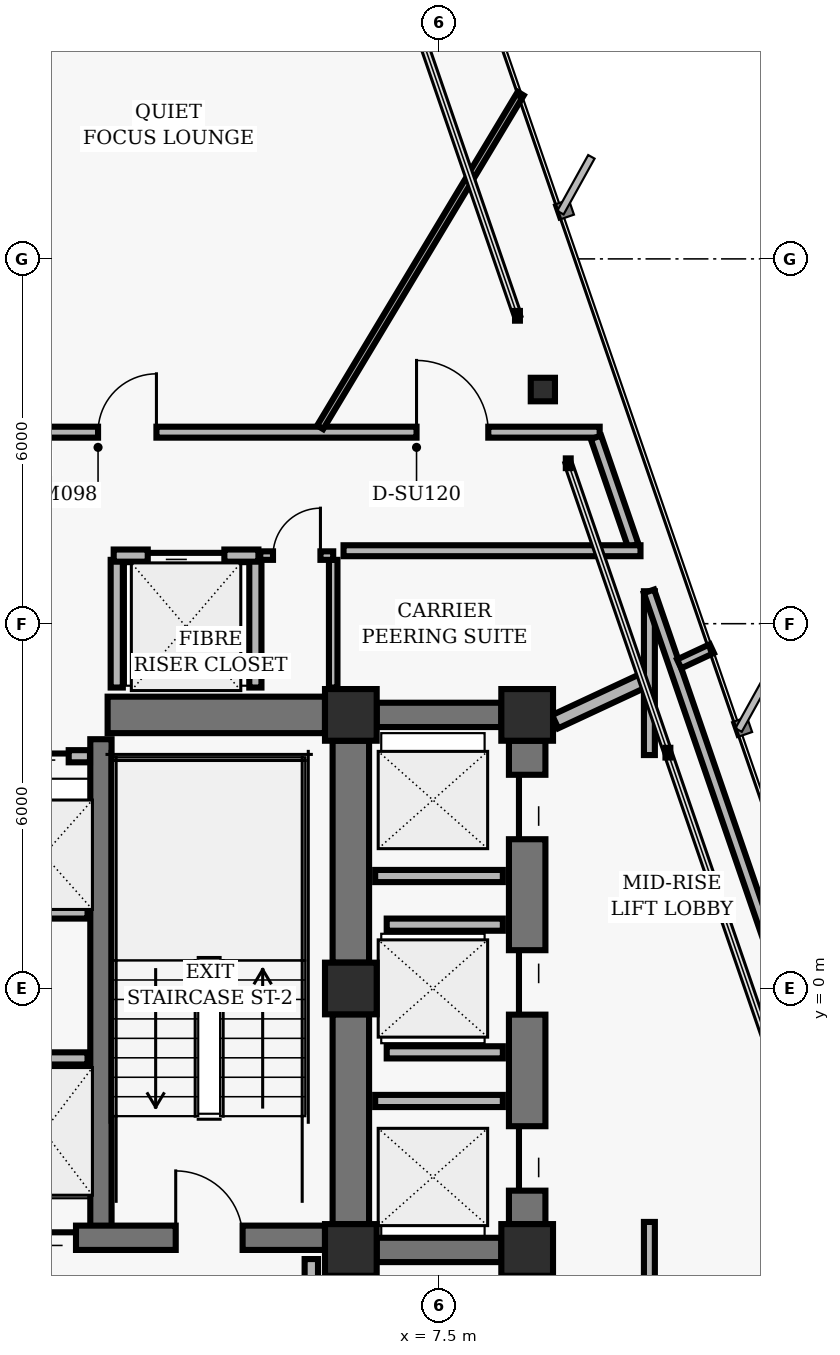
"""IFC4 building model, lengths in metres.
Left out: names, types, materials, properties, quantities, classifications, styles, units other than length and angle.
Written with IfcOpenShell. Run it as: python <this file> out.ifc"""

import sys

from ifc_helpers import new_model, si_unit, direction, frame, frame_2d, origin, origin_2d, place, context, subcontext, project, spatial, rectangle, hollow_rectangle, i_section, extrude, element, fill, save


model = new_model("IFC4")
c1 = context("Model", 3, precision=1e-05, world=origin(), true_north=direction((0.0, 1.0)))
c2 = subcontext(c1, "Body", "Model", "MODEL_VIEW")
j1 = project(units=[si_unit("LENGTHUNIT", "METRE"), si_unit("PLANEANGLEUNIT", "RADIAN")], contexts=[c1])
p1 = place(None, origin())
s1 = spatial("IfcSite", under=j1, at=p1, CompositionType="ELEMENT")
p2 = place(p1, origin())
s2 = spatial("IfcBuilding", under=s1, at=p2, CompositionType="ELEMENT")
p3 = place(p2, frame((0.0, 0.0, 168.48)))
s3 = spatial("IfcBuildingStorey", under=s2, at=p3, CompositionType="ELEMENT", Elevation=168.48)
for number, where, z_axis, x_axis in (
    (1, (6.05, 4.5, 0.0), (0.0, 0.0, 1.0), (1.0, 0.0, 0.0)),
    (2, (6.05, 0.0, 0.0), (0.0, 0.0, 1.0), (1.0, 0.0, 0.0)),
    (3, (6.05, -4.3, 0.0), (0.0, 0.0, 1.0), (1.0, 0.0, 0.0)),
    (4, (8.95, 4.5, 0.0), (0.0, 0.0, 1.0), (1.0, 0.0, 0.0)),
    (5, (8.95, -4.3, 0.0), (0.0, 0.0, 1.0), (1.0, 0.0, 0.0)),
):
    element("IfcColumn", number, at=place(p3, frame(where, z_axis=z_axis, x_axis=x_axis)), inside=s3, PredefinedType="COLUMN", context=c2, shape_type="SweptSolid", body=[
        extrude(hollow_rectangle(XDim=0.85, YDim=0.85, WallThickness=0.055, InnerFilletRadius=0.02, OuterFilletRadius=0.04, at=origin_2d()), origin(), (0.0, 0.0, 1.0), 3.04),
    ])
p4 = place(p3, frame((6.05, 0.425, 0.0), z_axis=(0.0, 0.0, 1.0), x_axis=(0.0, 1.0, 0.0)))
e6 = element("IfcWall", 6, at=p4, inside=s3, PredefinedType="SHEAR", context=c2, shape_type="SweptSolid", body=[
    extrude(rectangle(XDim=3.65, YDim=0.6, at=frame_2d((1.825, 0.0))), origin(), (0.0, 0.0, 1.0), 2.718),
])
p5 = place(p3, frame((6.05, -3.875, 0.0), z_axis=(0.0, 0.0, 1.0), x_axis=(0.0, 1.0, 0.0)))
e7 = element("IfcWall", 7, at=p5, inside=s3, PredefinedType="SHEAR", context=c2, shape_type="SweptSolid", body=[
    extrude(rectangle(XDim=3.45, YDim=0.6, at=frame_2d((1.725, 0.0))), origin(), (0.0, 0.0, 1.0), 2.718),
])
p6 = place(p3, frame((1.94, -4.1, 0.0), z_axis=(0.0, 0.0, 1.0), x_axis=(0.0, 1.0, 0.0)))
e8 = element("IfcWall", 8, at=p6, inside=s3, PredefinedType="SHEAR", context=c2, shape_type="SweptSolid", body=[
    extrude(rectangle(XDim=8.2, YDim=0.35, at=frame_2d((4.1, 0.0))), origin(), (0.0, 0.0, 1.0), 2.718),
])
p7 = place(p3, frame((-5.625, -4.1, 0.0), z_axis=(0.0, 0.0, 1.0), x_axis=(1.0, 0.0, 0.0)))
e9 = element("IfcWall", 9, at=p7, inside=s3, PredefinedType="SHEAR", context=c2, shape_type="SweptSolid", body=[
    extrude(rectangle(XDim=11.25, YDim=0.4, at=frame_2d((5.625, 0.0))), origin(), (0.0, 0.0, 1.0), 2.718),
])
p8 = place(p7, frame((1.355, 0.0, 0.0)))
e10 = element("IfcOpeningElement", 10, at=p8, cuts=e9, PredefinedType="OPENING", context=c2, shape_type="SweptSolid", body=[
    extrude(rectangle(XDim=1.1, YDim=2.04, at=frame_2d((0.55, 1.02))), frame((0.0, 0.21, 0.0), z_axis=(0.0, -1.0, 0.0), x_axis=(1.0, 0.0, 0.0)), (0.0, 0.0, 1.0), 0.42),
])
p9 = place(p7, frame((8.795, 0.0, 0.0)))
e11 = element("IfcOpeningElement", 11, at=p9, cuts=e9, PredefinedType="OPENING", context=c2, shape_type="SweptSolid", body=[
    extrude(rectangle(XDim=1.1, YDim=2.04, at=frame_2d((0.55, 1.02))), frame((0.0, 0.21, 0.0), z_axis=(0.0, -1.0, 0.0), x_axis=(1.0, 0.0, 0.0)), (0.0, 0.0, 1.0), 0.42),
])
p10 = place(p7, frame((4.095, 0.0, 0.0)))
e12 = element("IfcOpeningElement", 12, at=p10, cuts=e9, PredefinedType="OPENING", context=c2, shape_type="SweptSolid", body=[
    extrude(rectangle(XDim=1.06, YDim=2.04, at=frame_2d((0.53, 1.02))), frame((0.0, 0.21, 0.0), z_axis=(0.0, -1.0, 0.0), x_axis=(1.0, 0.0, 0.0)), (0.0, 0.0, 1.0), 0.42),
])
p11 = place(p7, frame((6.095, 0.0, 0.0)))
e13 = element("IfcOpeningElement", 13, at=p11, cuts=e9, PredefinedType="OPENING", context=c2, shape_type="SweptSolid", body=[
    extrude(rectangle(XDim=1.06, YDim=2.04, at=frame_2d((0.53, 1.02))), frame((0.0, 0.21, 0.0), z_axis=(0.0, -1.0, 0.0), x_axis=(1.0, 0.0, 0.0)), (0.0, 0.0, 1.0), 0.42),
])
p12 = place(p3, frame((2.05, 4.5, 0.0), z_axis=(0.0, 0.0, 1.0), x_axis=(1.0, 0.0, 0.0)))
e14 = element("IfcWall", 14, at=p12, inside=s3, PredefinedType="SHEAR", context=c2, shape_type="SweptSolid", body=[
    extrude(rectangle(XDim=3.575, YDim=0.6, at=frame_2d((1.788, 0.0))), origin(), (0.0, 0.0, 1.0), 2.718),
])
p13 = place(p3, frame((8.95, -3.875, 0.0), z_axis=(0.0, 0.0, 1.0), x_axis=(0.0, 1.0, 0.0)))
e15 = element("IfcWall", 15, at=p13, inside=s3, PredefinedType="SHEAR", context=c2, shape_type="SweptSolid", body=[
    extrude(rectangle(XDim=7.95, YDim=0.6, at=frame_2d((3.975, 0.0))), origin(), (0.0, 0.0, 1.0), 2.718),
])
p14 = place(p13, frame((0.55, 0.0, 0.0)))
e16 = element("IfcOpeningElement", 16, at=p14, cuts=e15, PredefinedType="OPENING", context=c2, shape_type="SweptSolid", body=[
    extrude(rectangle(XDim=1.06, YDim=2.04, at=frame_2d((0.53, 1.02))), frame((0.0, 0.31, 0.0), z_axis=(0.0, -1.0, 0.0), x_axis=(1.0, 0.0, 0.0)), (0.0, 0.0, 1.0), 0.62),
])
p15 = place(p13, frame((3.445, 0.0, 0.0)))
e17 = element("IfcOpeningElement", 17, at=p15, cuts=e15, PredefinedType="OPENING", context=c2, shape_type="SweptSolid", body=[
    extrude(rectangle(XDim=1.06, YDim=2.04, at=frame_2d((0.53, 1.02))), frame((0.0, 0.31, 0.0), z_axis=(0.0, -1.0, 0.0), x_axis=(1.0, 0.0, 0.0)), (0.0, 0.0, 1.0), 0.62),
])
p16 = place(p13, frame((6.33, 0.0, 0.0)))
e18 = element("IfcOpeningElement", 18, at=p16, cuts=e15, PredefinedType="OPENING", context=c2, shape_type="SweptSolid", body=[
    extrude(rectangle(XDim=1.06, YDim=2.04, at=frame_2d((0.53, 1.02))), frame((0.0, 0.31, 0.0), z_axis=(0.0, -1.0, 0.0), x_axis=(1.0, 0.0, 0.0)), (0.0, 0.0, 1.0), 0.62),
])
for number, where, z_axis, x_axis in (
    (19, (6.475, 4.5, 0.0), (0.0, 0.0, 1.0), (1.0, 0.0, 0.0)),
    (20, (6.475, -4.3, 0.0), (0.0, 0.0, 1.0), (1.0, 0.0, 0.0)),
):
    element("IfcWall", number, at=place(p3, frame(where, z_axis=z_axis, x_axis=x_axis)), inside=s3, PredefinedType="SHEAR", context=c2, shape_type="SweptSolid", body=[
        extrude(rectangle(XDim=2.05, YDim=0.4, at=frame_2d((1.025, 0.0))), origin(), (0.0, 0.0, 1.0), 2.718),
    ])
p17 = place(p3, frame((9.208, 9.851, 0.0), z_axis=(0.0, 0.0, 1.0), x_axis=(1.0, 0.0, 0.0)))
e21 = element("IfcColumn", 21, at=p17, inside=s3, PredefinedType="COLUMN", context=c2, shape_type="SweptSolid", body=[
    extrude(i_section(OverallWidth=0.398, OverallDepth=0.387, WebThickness=0.021, FlangeThickness=0.033, FilletRadius=0.018, at=origin_2d()), origin(), (0.0, 0.0, 1.0), 3.04),
])
p18 = place(p3, frame((-1.72, -1.15, 0.0), z_axis=(0.0, 0.0, 1.0), x_axis=(1.0, 0.0, 0.0)))
e22 = element("IfcWall", 22, at=p18, inside=s3, PredefinedType="PARTITIONING", context=c2, shape_type="SweptSolid", body=[
    extrude(rectangle(XDim=3.44, YDim=0.2, at=frame_2d((1.72, 0.0))), origin(), (0.0, 0.0, 1.0), 2.693),
])
p19 = place(p3, frame((5.4, -7.16, 0.0), z_axis=(0.0, 0.0, 1.0), x_axis=(0.0, 1.0, 0.0)))
e23 = element("IfcWall", 23, at=p19, inside=s3, PredefinedType="PARTITIONING", context=c2, shape_type="SweptSolid", body=[
    extrude(rectangle(XDim=2.71, YDim=0.22, at=frame_2d((1.355, 0.0))), origin(), (0.0, 0.0, 1.0), 2.693),
])
p20 = place(p3, frame((-1.72, 1.25, 0.0), z_axis=(0.0, 0.0, 1.0), x_axis=(1.0, 0.0, 0.0)))
e24 = element("IfcWall", 24, at=p20, inside=s3, PredefinedType="PARTITIONING", context=c2, shape_type="SweptSolid", body=[
    extrude(rectangle(XDim=3.44, YDim=0.2, at=frame_2d((1.72, 0.0))), origin(), (0.0, 0.0, 1.0), 2.693),
])
p21 = place(p3, frame((-1.76, 3.82, 0.0), z_axis=(0.0, 0.0, 1.0), x_axis=(1.0, 0.0, 0.0)))
e25 = element("IfcWall", 25, at=p21, inside=s3, PredefinedType="PARTITIONING", context=c2, shape_type="SweptSolid", body=[
    extrude(rectangle(XDim=3.52, YDim=0.2, at=frame_2d((1.76, 0.0))), origin(), (0.0, 0.0, 1.0), 2.693),
])
p22 = place(p21, frame((0.35, 0.0, 0.0)))
e26 = element("IfcOpeningElement", 26, at=p22, cuts=e25, PredefinedType="OPENING", context=c2, shape_type="SweptSolid", body=[
    extrude(rectangle(XDim=1.06, YDim=2.04, at=frame_2d((0.53, 1.02))), frame((0.0, 0.11, 0.0), z_axis=(0.0, -1.0, 0.0), x_axis=(1.0, 0.0, 0.0)), (0.0, 0.0, 1.0), 0.22),
])
p23 = place(p21, frame((2.11, 0.0, 0.0)))
e27 = element("IfcOpeningElement", 27, at=p23, cuts=e25, PredefinedType="OPENING", context=c2, shape_type="SweptSolid", body=[
    extrude(rectangle(XDim=1.06, YDim=2.04, at=frame_2d((0.53, 1.02))), frame((0.0, 0.11, 0.0), z_axis=(0.0, -1.0, 0.0), x_axis=(1.0, 0.0, 0.0)), (0.0, 0.0, 1.0), 0.22),
])
for number, where, z_axis, x_axis in (
    (28, (2.2, 4.95, 0.0), (0.0, 0.0, 1.0), (0.0, 1.0, 0.0)),
    (29, (4.48, 4.95, 0.0), (0.0, 0.0, 1.0), (0.0, 1.0, 0.0)),
):
    element("IfcWall", number, at=place(p3, frame(where, z_axis=z_axis, x_axis=x_axis)), inside=s3, PredefinedType="PARTITIONING", context=c2, shape_type="SweptSolid", body=[
        extrude(rectangle(XDim=2.1, YDim=0.2, at=frame_2d((1.05, 0.0))), origin(), (0.0, 0.0, 1.0), 2.693),
    ])
p24 = place(p3, frame((2.15, 7.12, 0.0), z_axis=(0.0, 0.0, 1.0), x_axis=(1.0, 0.0, 0.0)))
e30 = element("IfcWall", 30, at=p24, inside=s3, PredefinedType="PARTITIONING", context=c2, shape_type="SweptSolid", body=[
    extrude(rectangle(XDim=2.38, YDim=0.2, at=frame_2d((1.19, 0.0))), origin(), (0.0, 0.0, 1.0), 2.693),
])
p25 = place(p24, frame((0.56, 0.0, 0.0)))
e31 = element("IfcOpeningElement", 31, at=p25, cuts=e30, PredefinedType="OPENING", context=c2, shape_type="SweptSolid", body=[
    extrude(rectangle(XDim=1.26, YDim=2.06, at=frame_2d((0.63, 1.03))), frame((0.0, 0.11, 0.0), z_axis=(0.0, -1.0, 0.0), x_axis=(1.0, 0.0, 0.0)), (0.0, 0.0, 1.0), 0.22),
])
p26 = place(p3, frame((5.76, 4.95, 0.0), z_axis=(0.0, 0.0, 1.0), x_axis=(0.0, 1.0, 0.0)))
e32 = element("IfcWall", 32, at=p26, inside=s3, PredefinedType="PARTITIONING", context=c2, shape_type="SweptSolid", body=[
    extrude(rectangle(XDim=2.1, YDim=0.14, at=frame_2d((1.05, 0.0))), origin(), (0.0, 0.0, 1.0), 2.693),
])
p27 = place(p3, frame((4.56, 7.12, 0.0), z_axis=(0.0, 0.0, 1.0), x_axis=(1.0, 0.0, 0.0)))
e33 = element("IfcWall", 33, at=p27, inside=s3, PredefinedType="PARTITIONING", context=c2, shape_type="SweptSolid", body=[
    extrude(rectangle(XDim=1.2, YDim=0.14, at=frame_2d((0.6, 0.0))), origin(), (0.0, 0.0, 1.0), 2.693),
])
p28 = place(p27, frame((0.21, 0.0, 0.0)))
e34 = element("IfcOpeningElement", 34, at=p28, cuts=e33, PredefinedType="OPENING", context=c2, shape_type="SweptSolid", body=[
    extrude(rectangle(XDim=0.78, YDim=2.01, at=frame_2d((0.39, 1.005))), frame((0.0, 0.08, 0.0), z_axis=(0.0, -1.0, 0.0), x_axis=(1.0, 0.0, 0.0)), (0.0, 0.0, 1.0), 0.16),
])
for number, where, z_axis, x_axis in (
    (35, (6.45, -1.85, 0.0), (0.0, 0.0, 1.0), (1.0, 0.0, 0.0)),
    (36, (6.45, 1.85, 0.0), (0.0, 0.0, 1.0), (1.0, 0.0, 0.0)),
):
    element("IfcWall", number, at=place(p3, frame(where, z_axis=z_axis, x_axis=x_axis)), inside=s3, PredefinedType="PARTITIONING", context=c2, shape_type="SweptSolid", body=[
        extrude(rectangle(XDim=2.1, YDim=0.2, at=frame_2d((1.05, 0.0))), origin(), (0.0, 0.0, 1.0), 2.693),
    ])
for number, where, z_axis, x_axis in (
    (37, (6.64, -1.05, 0.0), (0.0, 0.0, 1.0), (1.0, 0.0, 0.0)),
    (38, (6.64, 1.05, 0.0), (0.0, 0.0, 1.0), (1.0, 0.0, 0.0)),
):
    element("IfcWall", number, at=place(p3, frame(where, z_axis=z_axis, x_axis=x_axis)), inside=s3, PredefinedType="PARTITIONING", context=c2, shape_type="SweptSolid", body=[
        extrude(rectangle(XDim=1.91, YDim=0.2, at=frame_2d((0.955, 0.0))), origin(), (0.0, 0.0, 1.0), 2.693),
    ])
p29 = place(p3, frame((-6.52, 9.15, 0.0), z_axis=(0.0, 0.0, 1.0), x_axis=(1.0, 0.0, 0.0)))
e39 = element("IfcWall", 39, at=p29, inside=s3, PredefinedType="PARTITIONING", context=c2, shape_type="SweptSolid", body=[
    extrude(rectangle(XDim=16.662, YDim=0.18, at=frame_2d((8.331, 0.0))), origin(), (0.0, 0.0, 1.0), 2.693),
])
p30 = place(p29, frame((13.65, 0.0, 0.0)))
e40 = element("IfcOpeningElement", 40, at=p30, cuts=e39, PredefinedType="OPENING", context=c2, shape_type="SweptSolid", body=[
    extrude(rectangle(XDim=1.18, YDim=2.02, at=frame_2d((0.59, 1.01))), frame((0.0, 0.1, 0.0), z_axis=(0.0, -1.0, 0.0), x_axis=(1.0, 0.0, 0.0)), (0.0, 0.0, 1.0), 0.2),
])
p31 = place(p29, frame((8.413, 0.0, 0.0)))
e41 = element("IfcOpeningElement", 41, at=p31, cuts=e39, PredefinedType="OPENING", context=c2, shape_type="SweptSolid", body=[
    extrude(rectangle(XDim=0.96, YDim=2.02, at=frame_2d((0.48, 1.01))), frame((0.0, 0.1, 0.0), z_axis=(0.0, -1.0, 0.0), x_axis=(1.0, 0.0, 0.0)), (0.0, 0.0, 1.0), 0.2),
])
p32 = place(p29, frame((2.396, 0.0, 0.0)))
e42 = element("IfcOpeningElement", 42, at=p32, cuts=e39, PredefinedType="OPENING", context=c2, shape_type="SweptSolid", body=[
    extrude(rectangle(XDim=1.18, YDim=2.02, at=frame_2d((0.59, 1.01))), frame((0.0, 0.1, 0.0), z_axis=(0.0, -1.0, 0.0), x_axis=(1.0, 0.0, 0.0)), (0.0, 0.0, 1.0), 0.2),
])
p33 = place(p3, frame((10.082, 9.065, 0.0), z_axis=(0.0, 0.0, 1.0), x_axis=(0.325550958337, -0.945524496524, 0.0)))
e43 = element("IfcWall", 43, at=p33, inside=s3, PredefinedType="PARTITIONING", context=c2, shape_type="SweptSolid", body=[
    extrude(rectangle(XDim=1.882, YDim=0.18, at=frame_2d((0.941, 0.0))), origin(), (0.0, 0.0, 1.0), 2.693),
])
p34 = place(p3, frame((10.814, 7.2, 0.0), z_axis=(0.0, 0.0, 1.0), x_axis=(-1.0, 0.0, 0.0)))
e44 = element("IfcWall", 44, at=p34, inside=s3, PredefinedType="PARTITIONING", context=c2, shape_type="SweptSolid", body=[
    extrude(rectangle(XDim=4.884, YDim=0.18, at=frame_2d((2.442, 0.0))), origin(), (0.0, 0.0, 1.0), 2.693),
])
p35 = place(p3, frame((10.96, -7.11, 0.0), z_axis=(0.0, 0.0, 1.0), x_axis=(0.0, 1.0, 0.0)))
e45 = element("IfcWall", 45, at=p35, inside=s3, PredefinedType="PARTITIONING", context=c2, shape_type="SweptSolid", body=[
    extrude(rectangle(XDim=3.271, YDim=0.18, at=frame_2d((1.635, 0.0))), origin(), (0.0, 0.0, 1.0), 2.693),
])
p36 = place(p3, frame((10.96, 3.84, 0.0), z_axis=(0.0, 0.0, 1.0), x_axis=(0.0, 1.0, 0.0)))
e46 = element("IfcWall", 46, at=p36, inside=s3, PredefinedType="PARTITIONING", context=c2, shape_type="SweptSolid", body=[
    extrude(rectangle(XDim=2.694, YDim=0.18, at=frame_2d((1.347, 0.0))), origin(), (0.0, 0.0, 1.0), 2.26),
])
p37 = place(p3, frame((10.954, 6.533, 0.0), z_axis=(0.0, 0.0, 1.0), x_axis=(0.325553439946, -0.945523642084, 0.0)))
e47 = element("IfcWall", 47, at=p37, inside=s3, PredefinedType="PARTITIONING", context=c2, shape_type="SweptSolid", body=[
    extrude(rectangle(XDim=11.22, YDim=0.18, at=frame_2d((5.61, 0.0))), origin(), (0.0, 0.0, 1.0), 2.693),
])
p38 = place(p3, frame((9.41, 4.388, 0.0), z_axis=(0.0, 0.0, 1.0), x_axis=(0.906286939212, 0.422662967166, 0.0)))
e48 = element("IfcWall", 48, at=p38, inside=s3, PredefinedType="PARTITIONING", context=c2, shape_type="SweptSolid", body=[
    extrude(rectangle(XDim=1.622, YDim=0.24, at=frame_2d((0.811, 0.0))), origin(), (0.0, 0.0, 1.0), 2.693),
])
p39 = place(p3, frame((11.449, 5.339, 0.0), z_axis=(0.0, 0.0, 1.0), x_axis=(0.906277748429, 0.422682673768, 0.0)))
e49 = element("IfcWall", 49, at=p39, inside=s3, PredefinedType="PARTITIONING", context=c2, shape_type="SweptSolid", body=[
    extrude(rectangle(XDim=0.593, YDim=0.16, at=frame_2d((0.297, 0.0))), origin(), (0.0, 0.0, 1.0), 2.693),
])
p40 = place(p3, frame((5.546, 9.23, 0.0), z_axis=(0.0, 0.0, 1.0), x_axis=(0.515028361349, 0.857173137123, 0.0)))
e50 = element("IfcWall", 50, at=p40, inside=s3, PredefinedType="MOVABLE", context=c2, shape_type="SweptSolid", body=[
    extrude(rectangle(XDim=6.403, YDim=0.115, at=frame_2d((3.201, 0.0))), origin(), (0.0, 0.0, 1.0), 2.693),
])
p41 = place(p9, origin())
e51 = element("IfcDoor", 51, at=p41, inside=s3, OperationType="SINGLE_SWING_LEFT", PredefinedType="DOOR", context=c2, shape_type="SweptSolid", body=[
    extrude(rectangle(XDim=1.1, YDim=2.04, at=frame_2d((0.55, 1.02))), frame((0.0, 0.025, 0.0), z_axis=(0.0, -1.0, 0.0), x_axis=(1.0, 0.0, 0.0)), (0.0, 0.0, 1.0), 0.05),
])
fill(e11, e51)
p42 = place(p11, origin())
e52 = element("IfcDoor", 52, at=p42, inside=s3, OperationType="SLIDING_TO_RIGHT", PredefinedType="DOOR", context=c2, shape_type="SweptSolid", body=[
    extrude(rectangle(XDim=1.06, YDim=2.04, at=frame_2d((0.53, 1.02))), frame((0.0, 0.025, 0.0), z_axis=(0.0, -1.0, 0.0), x_axis=(1.0, 0.0, 0.0)), (0.0, 0.0, 1.0), 0.05),
])
fill(e13, e52)
p43 = place(p23, origin())
e53 = element("IfcDoor", 53, at=p43, inside=s3, OperationType="SLIDING_TO_RIGHT", PredefinedType="DOOR", context=c2, shape_type="SweptSolid", body=[
    extrude(rectangle(XDim=1.06, YDim=2.04, at=frame_2d((0.53, 1.02))), frame((0.0, 0.025, 0.0), z_axis=(0.0, -1.0, 0.0), x_axis=(1.0, 0.0, 0.0)), (0.0, 0.0, 1.0), 0.05),
])
fill(e27, e53)
p44 = place(p25, origin())
e54 = element("IfcDoor", 54, at=p44, inside=s3, OperationType="SLIDING_TO_LEFT", PredefinedType="DOOR", context=c2, shape_type="SweptSolid", body=[
    extrude(rectangle(XDim=1.26, YDim=2.06, at=frame_2d((0.63, 1.03))), frame((0.0, 0.025, 0.0), z_axis=(0.0, -1.0, 0.0), x_axis=(1.0, 0.0, 0.0)), (0.0, 0.0, 1.0), 0.05),
])
fill(e31, e54)
p45 = place(p28, origin())
e55 = element("IfcDoor", 55, at=p45, inside=s3, OperationType="SINGLE_SWING_RIGHT", PredefinedType="DOOR", context=c2, shape_type="SweptSolid", body=[
    extrude(rectangle(XDim=0.78, YDim=2.01, at=frame_2d((0.39, 1.005))), frame((0.0, 0.025, 0.0), z_axis=(0.0, -1.0, 0.0), x_axis=(1.0, 0.0, 0.0)), (0.0, 0.0, 1.0), 0.05),
])
fill(e34, e55)
p46 = place(p14, origin())
e56 = element("IfcDoor", 56, at=p46, inside=s3, OperationType="SLIDING_TO_LEFT", PredefinedType="DOOR", context=c2, shape_type="SweptSolid", body=[
    extrude(rectangle(XDim=1.06, YDim=2.04, at=frame_2d((0.53, 1.02))), frame((0.0, 0.025, 0.0), z_axis=(0.0, -1.0, 0.0), x_axis=(1.0, 0.0, 0.0)), (0.0, 0.0, 1.0), 0.05),
])
fill(e16, e56)
p47 = place(p15, origin())
e57 = element("IfcDoor", 57, at=p47, inside=s3, OperationType="SLIDING_TO_RIGHT", PredefinedType="DOOR", context=c2, shape_type="SweptSolid", body=[
    extrude(rectangle(XDim=1.06, YDim=2.04, at=frame_2d((0.53, 1.02))), frame((0.0, 0.025, 0.0), z_axis=(0.0, -1.0, 0.0), x_axis=(1.0, 0.0, 0.0)), (0.0, 0.0, 1.0), 0.05),
])
fill(e17, e57)
p48 = place(p16, origin())
e58 = element("IfcDoor", 58, at=p48, inside=s3, OperationType="SLIDING_TO_LEFT", PredefinedType="DOOR", context=c2, shape_type="SweptSolid", body=[
    extrude(rectangle(XDim=1.06, YDim=2.04, at=frame_2d((0.53, 1.02))), frame((0.0, 0.025, 0.0), z_axis=(0.0, -1.0, 0.0), x_axis=(1.0, 0.0, 0.0)), (0.0, 0.0, 1.0), 0.05),
])
fill(e18, e58)
p49 = place(p30, origin())
e59 = element("IfcDoor", 59, at=p49, inside=s3, OperationType="SINGLE_SWING_LEFT", PredefinedType="DOOR", context=c2, shape_type="SweptSolid", body=[
    extrude(rectangle(XDim=1.18, YDim=2.02, at=frame_2d((0.59, 1.01))), frame((0.0, 0.025, 0.0), z_axis=(0.0, -1.0, 0.0), x_axis=(1.0, 0.0, 0.0)), (0.0, 0.0, 1.0), 0.05),
])
fill(e40, e59)
p50 = place(p31, origin())
e60 = element("IfcDoor", 60, at=p50, inside=s3, OperationType="SINGLE_SWING_RIGHT", PredefinedType="DOOR", context=c2, shape_type="SweptSolid", body=[
    extrude(rectangle(XDim=0.96, YDim=2.02, at=frame_2d((0.48, 1.01))), frame((0.0, 0.025, 0.0), z_axis=(0.0, -1.0, 0.0), x_axis=(1.0, 0.0, 0.0)), (0.0, 0.0, 1.0), 0.05),
])
fill(e41, e60)
save(model, sys.argv[1])
